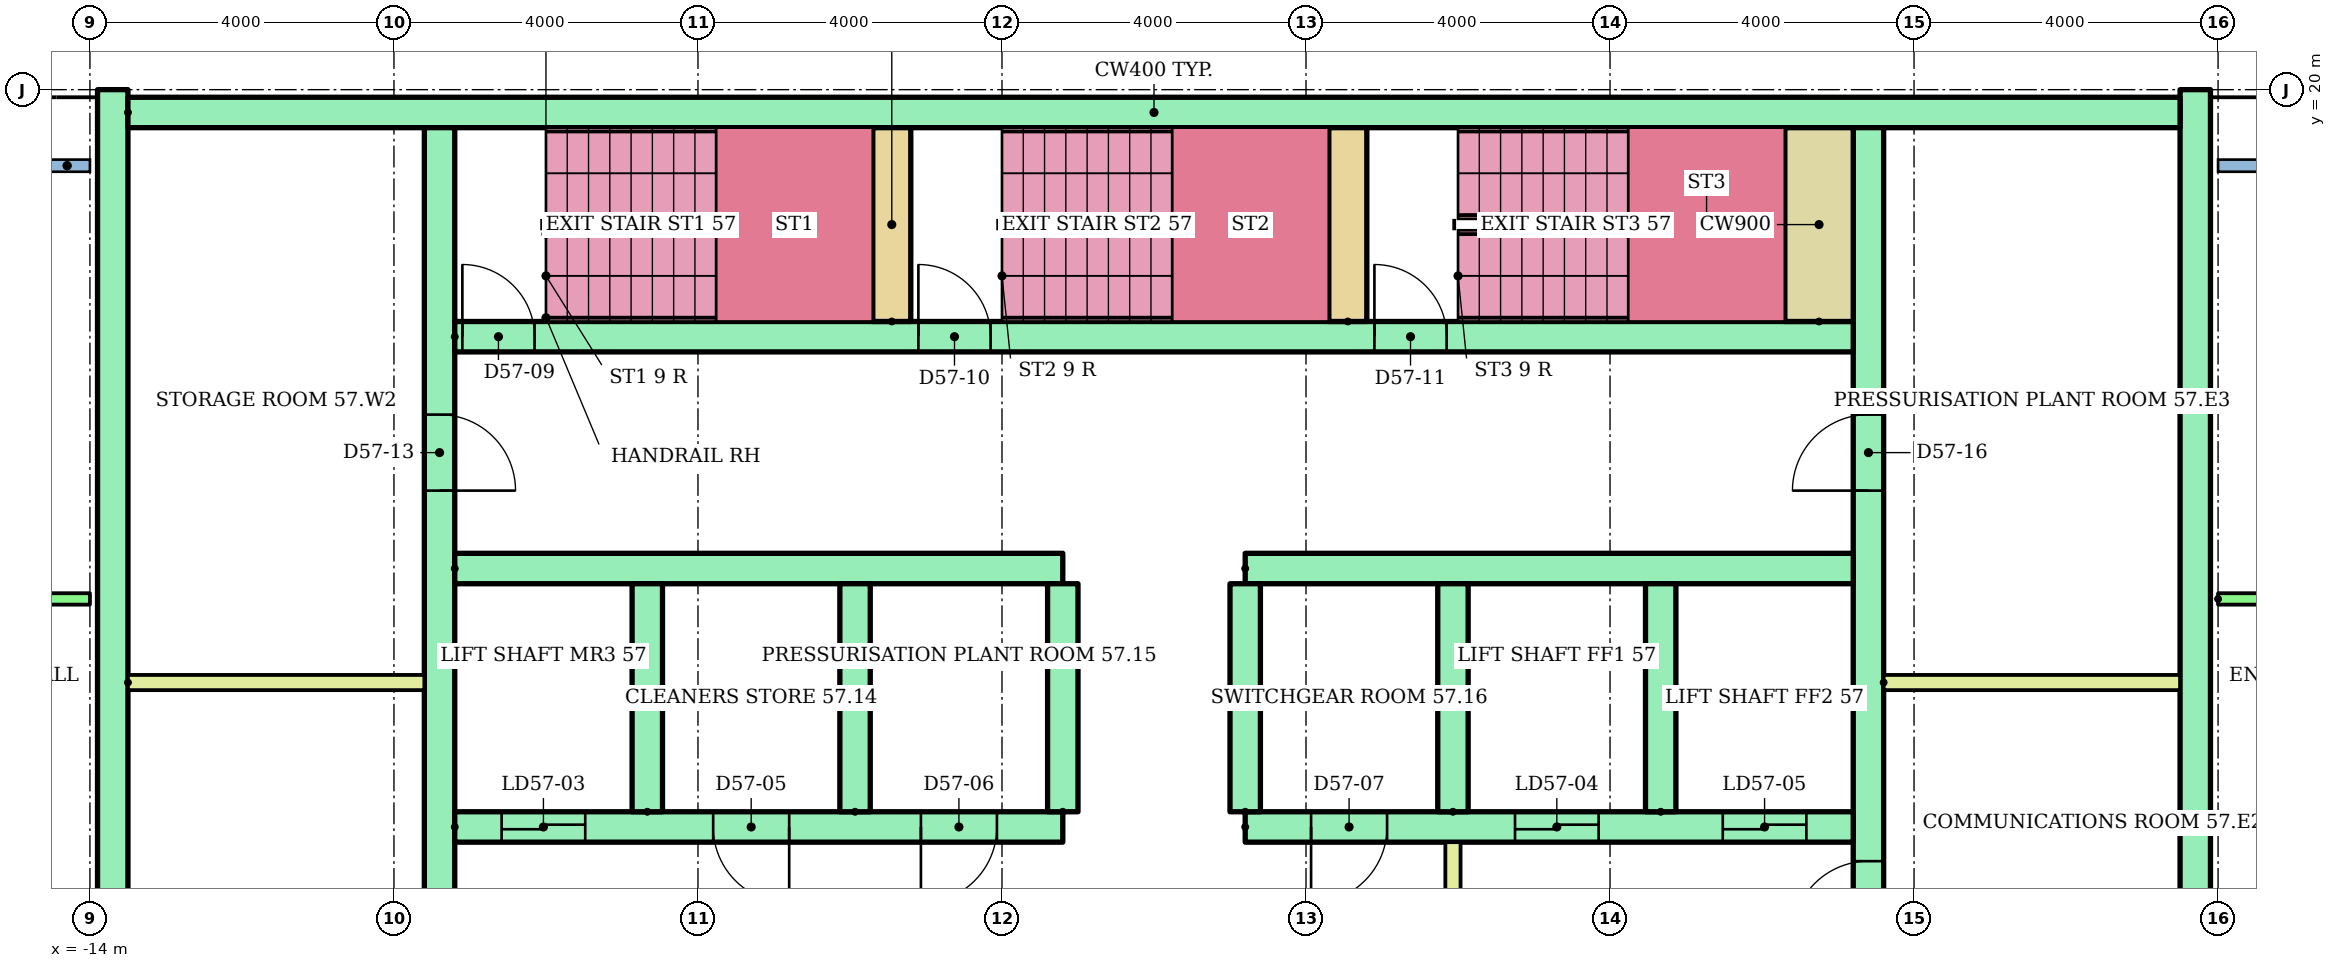
"""IFC4 building model, lengths in metres.
Left out: names, types, materials, properties, quantities, classifications, styles, units other than length and angle.
Written with IfcOpenShell. Run it as: python <this file> out.ifc"""

import sys

from ifc_helpers import new_model, si_unit, direction, frame, frame_2d, origin, place, context, subcontext, project, spatial, rectangle, extrude, element, fill, save


model = new_model("IFC4")
c1 = context("Model", 3, precision=1e-05, world=origin(), true_north=direction((0.0, 1.0)))
c2 = subcontext(c1, "Body", "Model", "MODEL_VIEW")
j1 = project(units=[si_unit("LENGTHUNIT", "METRE"), si_unit("PLANEANGLEUNIT", "RADIAN")], contexts=[c1])
p1 = place(None, origin())
s1 = spatial("IfcSite", under=j1, at=p1, CompositionType="ELEMENT")
p2 = place(p1, origin())
s2 = spatial("IfcBuilding", under=s1, at=p2, CompositionType="ELEMENT")
p3 = place(p2, frame((0.0, 0.0, 220.4)))
s3 = spatial("IfcBuildingStorey", under=s2, at=p3, CompositionType="ELEMENT", Elevation=220.4)
for number, where, z_axis, x_axis in (
    (1, (-13.7, 3.0, 0.0), (0.0, 0.0, 1.0), (0.0, 1.0, 0.0)),
    (2, (13.7, 3.0, 0.0), (0.0, 0.0, 1.0), (0.0, 1.0, 0.0)),
):
    element("IfcWall", number, at=place(p3, frame(where, z_axis=z_axis, x_axis=x_axis)), inside=s3, PredefinedType="SHEAR", context=c2, shape_type="SweptSolid", body=[
        extrude(rectangle(XDim=17.0, YDim=0.4, at=frame_2d((8.5, 0.0))), origin(), (0.0, 0.0, 1.0), 2.92),
    ])
p4 = place(p3, frame((-13.5, 19.7, 0.0)))
e3 = element("IfcWall", 3, at=p4, inside=s3, PredefinedType="SHEAR", context=c2, shape_type="SweptSolid", body=[
    extrude(rectangle(XDim=27.0, YDim=0.4, at=frame_2d((13.5, 0.0))), origin(), (0.0, 0.0, 1.0), 2.92),
])
p5 = place(p3, frame((-9.4, 6.8, 0.0), z_axis=(0.0, 0.0, 1.0), x_axis=(0.0, 1.0, 0.0)))
e4 = element("IfcWall", 4, at=p5, inside=s3, PredefinedType="SHEAR", context=c2, shape_type="SweptSolid", body=[
    extrude(rectangle(XDim=12.7, YDim=0.4, at=frame_2d((6.35, 0.0))), origin(), (0.0, 0.0, 1.0), 2.92),
])
p6 = place(p5, frame((1.15, 0.0, 0.0)))
e5 = element("IfcOpeningElement", 5, at=p6, cuts=e4, PredefinedType="OPENING", context=c2, shape_type="SweptSolid", body=[
    extrude(rectangle(XDim=1.0, YDim=2.1, at=frame_2d((0.5, 1.05))), frame((0.0, 0.21, 0.0), z_axis=(0.0, -1.0, 0.0), x_axis=(1.0, 0.0, 0.0)), (0.0, 0.0, 1.0), 0.42),
])
p7 = place(p5, frame((7.925, 0.0, 0.0)))
e6 = element("IfcOpeningElement", 6, at=p7, cuts=e4, PredefinedType="OPENING", context=c2, shape_type="SweptSolid", body=[
    extrude(rectangle(XDim=1.0, YDim=2.1, at=frame_2d((0.5, 1.05))), frame((0.0, 0.21, 0.0), z_axis=(0.0, -1.0, 0.0), x_axis=(1.0, 0.0, 0.0)), (0.0, 0.0, 1.0), 0.42),
])
p8 = place(p3, frame((9.4, 6.8, 0.0), z_axis=(0.0, 0.0, 1.0), x_axis=(0.0, 1.0, 0.0)))
e7 = element("IfcWall", 7, at=p8, inside=s3, PredefinedType="SHEAR", context=c2, shape_type="SweptSolid", body=[
    extrude(rectangle(XDim=12.7, YDim=0.4, at=frame_2d((6.35, 0.0))), origin(), (0.0, 0.0, 1.0), 2.92),
])
p9 = place(p8, frame((0.3, 0.0, 0.0)))
e8 = element("IfcOpeningElement", 8, at=p9, cuts=e7, PredefinedType="OPENING", context=c2, shape_type="SweptSolid", body=[
    extrude(rectangle(XDim=1.0, YDim=2.1, at=frame_2d((0.5, 1.05))), frame((0.0, 0.21, 0.0), z_axis=(0.0, -1.0, 0.0), x_axis=(1.0, 0.0, 0.0)), (0.0, 0.0, 1.0), 0.42),
])
p10 = place(p8, frame((2.05, 0.0, 0.0)))
e9 = element("IfcOpeningElement", 9, at=p10, cuts=e7, PredefinedType="OPENING", context=c2, shape_type="SweptSolid", body=[
    extrude(rectangle(XDim=1.0, YDim=2.1, at=frame_2d((0.5, 1.05))), frame((0.0, 0.21, 0.0), z_axis=(0.0, -1.0, 0.0), x_axis=(1.0, 0.0, 0.0)), (0.0, 0.0, 1.0), 0.42),
])
p11 = place(p8, frame((7.925, 0.0, 0.0)))
e10 = element("IfcOpeningElement", 10, at=p11, cuts=e7, PredefinedType="OPENING", context=c2, shape_type="SweptSolid", body=[
    extrude(rectangle(XDim=1.0, YDim=2.1, at=frame_2d((0.5, 1.05))), frame((0.0, 0.21, 0.0), z_axis=(0.0, -1.0, 0.0), x_axis=(1.0, 0.0, 0.0)), (0.0, 0.0, 1.0), 0.42),
])
p12 = place(p3, frame((-9.2, 10.3, 0.0)))
e11 = element("IfcWall", 11, at=p12, inside=s3, PredefinedType="SHEAR", context=c2, shape_type="SweptSolid", body=[
    extrude(rectangle(XDim=8.0, YDim=0.4, at=frame_2d((4.0, 0.0))), origin(), (0.0, 0.0, 1.0), 2.92),
])
p13 = place(p12, frame((0.617, 0.0, 0.0)))
e12 = element("IfcOpeningElement", 12, at=p13, cuts=e11, PredefinedType="OPENING", context=c2, shape_type="SweptSolid", body=[
    extrude(rectangle(XDim=1.1, YDim=2.1, at=frame_2d((0.55, 1.05))), frame((0.0, 0.21, 0.0), z_axis=(0.0, -1.0, 0.0), x_axis=(1.0, 0.0, 0.0)), (0.0, 0.0, 1.0), 0.42),
])
p14 = place(p12, frame((3.4, 0.0, 0.0)))
e13 = element("IfcOpeningElement", 13, at=p14, cuts=e11, PredefinedType="OPENING", context=c2, shape_type="SweptSolid", body=[
    extrude(rectangle(XDim=1.0, YDim=2.1, at=frame_2d((0.5, 1.05))), frame((0.0, 0.21, 0.0), z_axis=(0.0, -1.0, 0.0), x_axis=(1.0, 0.0, 0.0)), (0.0, 0.0, 1.0), 0.42),
])
p15 = place(p12, frame((6.133, 0.0, 0.0)))
e14 = element("IfcOpeningElement", 14, at=p15, cuts=e11, PredefinedType="OPENING", context=c2, shape_type="SweptSolid", body=[
    extrude(rectangle(XDim=1.0, YDim=2.1, at=frame_2d((0.5, 1.05))), frame((0.0, 0.21, 0.0), z_axis=(0.0, -1.0, 0.0), x_axis=(1.0, 0.0, 0.0)), (0.0, 0.0, 1.0), 0.42),
])
p16 = place(p3, frame((-9.2, 13.7, 0.0)))
e15 = element("IfcWall", 15, at=p16, inside=s3, PredefinedType="SHEAR", context=c2, shape_type="SweptSolid", body=[
    extrude(rectangle(XDim=8.0, YDim=0.4, at=frame_2d((4.0, 0.0))), origin(), (0.0, 0.0, 1.0), 2.92),
])
p17 = place(p3, frame((1.2, 10.3, 0.0)))
e16 = element("IfcWall", 16, at=p17, inside=s3, PredefinedType="SHEAR", context=c2, shape_type="SweptSolid", body=[
    extrude(rectangle(XDim=8.0, YDim=0.4, at=frame_2d((4.0, 0.0))), origin(), (0.0, 0.0, 1.0), 2.92),
])
p18 = place(p17, frame((3.55, 0.0, 0.0)))
e17 = element("IfcOpeningElement", 17, at=p18, cuts=e16, PredefinedType="OPENING", context=c2, shape_type="SweptSolid", body=[
    extrude(rectangle(XDim=1.1, YDim=2.1, at=frame_2d((0.55, 1.05))), frame((0.0, 0.21, 0.0), z_axis=(0.0, -1.0, 0.0), x_axis=(1.0, 0.0, 0.0)), (0.0, 0.0, 1.0), 0.42),
])
p19 = place(p17, frame((6.283, 0.0, 0.0)))
e18 = element("IfcOpeningElement", 18, at=p19, cuts=e16, PredefinedType="OPENING", context=c2, shape_type="SweptSolid", body=[
    extrude(rectangle(XDim=1.1, YDim=2.1, at=frame_2d((0.55, 1.05))), frame((0.0, 0.21, 0.0), z_axis=(0.0, -1.0, 0.0), x_axis=(1.0, 0.0, 0.0)), (0.0, 0.0, 1.0), 0.42),
])
p20 = place(p17, frame((0.867, 0.0, 0.0)))
e19 = element("IfcOpeningElement", 19, at=p20, cuts=e16, PredefinedType="OPENING", context=c2, shape_type="SweptSolid", body=[
    extrude(rectangle(XDim=1.0, YDim=2.1, at=frame_2d((0.5, 1.05))), frame((0.0, 0.21, 0.0), z_axis=(0.0, -1.0, 0.0), x_axis=(1.0, 0.0, 0.0)), (0.0, 0.0, 1.0), 0.42),
])
p21 = place(p3, frame((1.2, 13.7, 0.0)))
e20 = element("IfcWall", 20, at=p21, inside=s3, PredefinedType="SHEAR", context=c2, shape_type="SweptSolid", body=[
    extrude(rectangle(XDim=8.0, YDim=0.4, at=frame_2d((4.0, 0.0))), origin(), (0.0, 0.0, 1.0), 2.92),
])
for number, where, z_axis, x_axis in (
    (21, (-6.667, 10.5, 0.0), (0.0, 0.0, 1.0), (0.0, 1.0, 0.0)),
    (22, (-3.933, 10.5, 0.0), (0.0, 0.0, 1.0), (0.0, 1.0, 0.0)),
    (23, (-1.2, 10.5, 0.0), (0.0, 0.0, 1.0), (0.0, 1.0, 0.0)),
    (24, (1.2, 10.5, 0.0), (0.0, 0.0, 1.0), (0.0, 1.0, 0.0)),
    (25, (3.933, 10.5, 0.0), (0.0, 0.0, 1.0), (0.0, 1.0, 0.0)),
    (26, (6.667, 10.5, 0.0), (0.0, 0.0, 1.0), (0.0, 1.0, 0.0)),
):
    element("IfcWall", number, at=place(p3, frame(where, z_axis=z_axis, x_axis=x_axis)), inside=s3, PredefinedType="SHEAR", context=c2, shape_type="SweptSolid", body=[
        extrude(rectangle(XDim=3.0, YDim=0.4, at=frame_2d((1.5, 0.0))), origin(), (0.0, 0.0, 1.0), 2.92),
    ])
p22 = place(p3, frame((3.933, 6.8, 0.0), z_axis=(0.0, 0.0, 1.0), x_axis=(0.0, 1.0, 0.0)))
e27 = element("IfcWall", 27, at=p22, inside=s3, PredefinedType="PARTITIONING", context=c2, shape_type="SweptSolid", body=[
    extrude(rectangle(XDim=3.3, YDim=0.2, at=frame_2d((1.65, 0.0))), origin(), (0.0, 0.0, 1.0), 2.92),
])
p23 = place(p22, frame((1.1, 0.0, 0.0)))
e28 = element("IfcOpeningElement", 28, at=p23, cuts=e27, PredefinedType="OPENING", context=c2, shape_type="SweptSolid", body=[
    extrude(rectangle(XDim=1.1, YDim=2.1, at=frame_2d((0.55, 1.05))), frame((0.0, 0.11, 0.0), z_axis=(0.0, -1.0, 0.0), x_axis=(1.0, 0.0, 0.0)), (0.0, 0.0, 1.0), 0.22),
])
p24 = place(p3, frame((-9.2, 16.75, 0.0)))
e29 = element("IfcWall", 29, at=p24, inside=s3, PredefinedType="SHEAR", context=c2, shape_type="SweptSolid", body=[
    extrude(rectangle(XDim=18.4, YDim=0.4, at=frame_2d((9.2, 0.0))), origin(), (0.0, 0.0, 1.0), 2.92),
])
p25 = place(p24, frame((0.1, 0.0, 0.0)))
e30 = element("IfcOpeningElement", 30, at=p25, cuts=e29, PredefinedType="OPENING", context=c2, shape_type="SweptSolid", body=[
    extrude(rectangle(XDim=0.95, YDim=2.1, at=frame_2d((0.475, 1.05))), frame((0.0, 0.21, 0.0), z_axis=(0.0, -1.0, 0.0), x_axis=(1.0, 0.0, 0.0)), (0.0, 0.0, 1.0), 0.42),
])
p26 = place(p24, frame((6.1, 0.0, 0.0)))
e31 = element("IfcOpeningElement", 31, at=p26, cuts=e29, PredefinedType="OPENING", context=c2, shape_type="SweptSolid", body=[
    extrude(rectangle(XDim=0.95, YDim=2.1, at=frame_2d((0.475, 1.05))), frame((0.0, 0.21, 0.0), z_axis=(0.0, -1.0, 0.0), x_axis=(1.0, 0.0, 0.0)), (0.0, 0.0, 1.0), 0.42),
])
p27 = place(p24, frame((12.1, 0.0, 0.0)))
e32 = element("IfcOpeningElement", 32, at=p27, cuts=e29, PredefinedType="OPENING", context=c2, shape_type="SweptSolid", body=[
    extrude(rectangle(XDim=0.95, YDim=2.1, at=frame_2d((0.475, 1.05))), frame((0.0, 0.21, 0.0), z_axis=(0.0, -1.0, 0.0), x_axis=(1.0, 0.0, 0.0)), (0.0, 0.0, 1.0), 0.42),
])
for number, where, z_axis, x_axis in (
    (33, (-3.45, 16.95, 0.0), (0.0, 0.0, 1.0), (0.0, 1.0, 0.0)),
    (34, (2.55, 16.95, 0.0), (0.0, 0.0, 1.0), (0.0, 1.0, 0.0)),
):
    element("IfcWall", number, at=place(p3, frame(where, z_axis=z_axis, x_axis=x_axis)), inside=s3, PredefinedType="SHEAR", context=c2, shape_type="SweptSolid", body=[
        extrude(rectangle(XDim=2.55, YDim=0.5, at=frame_2d((1.275, 0.0))), origin(), (0.0, 0.0, 1.0), 2.92),
    ])
p28 = place(p3, frame((8.75, 16.95, 0.0), z_axis=(0.0, 0.0, 1.0), x_axis=(0.0, 1.0, 0.0)))
e35 = element("IfcWall", 35, at=p28, inside=s3, PredefinedType="SHEAR", context=c2, shape_type="SweptSolid", body=[
    extrude(rectangle(XDim=2.55, YDim=0.9, at=frame_2d((1.275, 0.0))), origin(), (0.0, 0.0, 1.0), 2.92),
])
for number, where in (
    (36, (-13.5, 12.2, 0.0)),
    (37, (9.6, 12.2, 0.0)),
):
    element("IfcWall", number, at=place(p3, frame(where)), inside=s3, PredefinedType="PARTITIONING", context=c2, shape_type="SweptSolid", body=[
        extrude(rectangle(XDim=3.9, YDim=0.2, at=frame_2d((1.95, 0.0))), origin(), (0.0, 0.0, 1.0), 2.92),
    ])
p29 = place(p3, frame((-28.92, 13.3, 0.0)))
e38 = element("IfcWall", 38, at=p29, inside=s3, PredefinedType="PARTITIONING", context=c2, shape_type="SweptSolid", body=[
    extrude(rectangle(XDim=14.92, YDim=0.15, at=frame_2d((7.46, 0.0))), origin(), (0.0, 0.0, 1.0), 2.4),
])
p30 = place(p29, frame((1.97, 0.0, 0.0)))
e39 = element("IfcOpeningElement", 39, at=p30, cuts=e38, PredefinedType="OPENING", context=c2, shape_type="SweptSolid", body=[
    extrude(rectangle(XDim=1.0, YDim=2.1, at=frame_2d((0.5, 1.05))), frame((0.0, 0.085, 0.0), z_axis=(0.0, -1.0, 0.0), x_axis=(1.0, 0.0, 0.0)), (0.0, 0.0, 1.0), 0.17),
])
p31 = place(p29, frame((9.37, 0.0, 0.0)))
e40 = element("IfcOpeningElement", 40, at=p31, cuts=e38, PredefinedType="OPENING", context=c2, shape_type="SweptSolid", body=[
    extrude(rectangle(XDim=0.9, YDim=2.1, at=frame_2d((0.45, 1.05))), frame((0.0, 0.085, 0.0), z_axis=(0.0, -1.0, 0.0), x_axis=(1.0, 0.0, 0.0)), (0.0, 0.0, 1.0), 0.17),
])
p32 = place(p3, frame((14.0, 13.3, 0.0)))
e41 = element("IfcWall", 41, at=p32, inside=s3, PredefinedType="PARTITIONING", context=c2, shape_type="SweptSolid", body=[
    extrude(rectangle(XDim=14.92, YDim=0.15, at=frame_2d((7.46, 0.0))), origin(), (0.0, 0.0, 1.0), 2.4),
])
p33 = place(p32, frame((1.55, 0.0, 0.0)))
e42 = element("IfcOpeningElement", 42, at=p33, cuts=e41, PredefinedType="OPENING", context=c2, shape_type="SweptSolid", body=[
    extrude(rectangle(XDim=0.9, YDim=2.1, at=frame_2d((0.45, 1.05))), frame((0.0, 0.085, 0.0), z_axis=(0.0, -1.0, 0.0), x_axis=(1.0, 0.0, 0.0)), (0.0, 0.0, 1.0), 0.17),
])
p34 = place(p32, frame((6.6, 0.0, 0.0)))
e43 = element("IfcOpeningElement", 43, at=p34, cuts=e41, PredefinedType="OPENING", context=c2, shape_type="SweptSolid", body=[
    extrude(rectangle(XDim=1.0, YDim=2.1, at=frame_2d((0.5, 1.05))), frame((0.0, 0.085, 0.0), z_axis=(0.0, -1.0, 0.0), x_axis=(1.0, 0.0, 0.0)), (0.0, 0.0, 1.0), 0.17),
])
p35 = place(p32, frame((12.0, 0.0, 0.0)))
e44 = element("IfcOpeningElement", 44, at=p35, cuts=e41, PredefinedType="OPENING", context=c2, shape_type="SweptSolid", body=[
    extrude(rectangle(XDim=0.9, YDim=2.1, at=frame_2d((0.45, 1.05))), frame((0.0, 0.085, 0.0), z_axis=(0.0, -1.0, 0.0), x_axis=(1.0, 0.0, 0.0)), (0.0, 0.0, 1.0), 0.17),
])
p36 = place(p13, origin())
e45 = element("IfcDoor", 45, at=p36, inside=s3, OperationType="SLIDING_TO_LEFT", PredefinedType="DOOR", context=c2, shape_type="SweptSolid", body=[
    extrude(rectangle(XDim=1.1, YDim=2.1, at=frame_2d((0.55, 1.05))), frame((0.0, 0.025, 0.0), z_axis=(0.0, -1.0, 0.0), x_axis=(1.0, 0.0, 0.0)), (0.0, 0.0, 1.0), 0.05),
])
fill(e12, e45)
p37 = place(p18, origin())
e46 = element("IfcDoor", 46, at=p37, inside=s3, OperationType="SLIDING_TO_LEFT", PredefinedType="DOOR", context=c2, shape_type="SweptSolid", body=[
    extrude(rectangle(XDim=1.1, YDim=2.1, at=frame_2d((0.55, 1.05))), frame((0.0, 0.025, 0.0), z_axis=(0.0, -1.0, 0.0), x_axis=(1.0, 0.0, 0.0)), (0.0, 0.0, 1.0), 0.05),
])
fill(e17, e46)
p38 = place(p19, origin())
e47 = element("IfcDoor", 47, at=p38, inside=s3, OperationType="SLIDING_TO_LEFT", PredefinedType="DOOR", context=c2, shape_type="SweptSolid", body=[
    extrude(rectangle(XDim=1.1, YDim=2.1, at=frame_2d((0.55, 1.05))), frame((0.0, 0.025, 0.0), z_axis=(0.0, -1.0, 0.0), x_axis=(1.0, 0.0, 0.0)), (0.0, 0.0, 1.0), 0.05),
])
fill(e18, e47)
p39 = place(p14, frame((1.0, 0.0, 0.0), z_axis=(0.0, 0.0, 1.0), x_axis=(-1.0, 0.0, 0.0)))
e48 = element("IfcDoor", 48, at=p39, inside=s3, OperationType="SINGLE_SWING_RIGHT", PredefinedType="DOOR", context=c2, shape_type="SweptSolid", body=[
    extrude(rectangle(XDim=1.0, YDim=2.1, at=frame_2d((0.5, 1.05))), frame((0.0, 0.025, 0.0), z_axis=(0.0, -1.0, 0.0), x_axis=(1.0, 0.0, 0.0)), (0.0, 0.0, 1.0), 0.05),
])
fill(e13, e48)
p40 = place(p15, frame((1.0, 0.0, 0.0), z_axis=(0.0, 0.0, 1.0), x_axis=(-1.0, 0.0, 0.0)))
e49 = element("IfcDoor", 49, at=p40, inside=s3, OperationType="SINGLE_SWING_LEFT", PredefinedType="DOOR", context=c2, shape_type="SweptSolid", body=[
    extrude(rectangle(XDim=1.0, YDim=2.1, at=frame_2d((0.5, 1.05))), frame((0.0, 0.025, 0.0), z_axis=(0.0, -1.0, 0.0), x_axis=(1.0, 0.0, 0.0)), (0.0, 0.0, 1.0), 0.05),
])
fill(e14, e49)
p41 = place(p20, frame((1.0, 0.0, 0.0), z_axis=(0.0, 0.0, 1.0), x_axis=(-1.0, 0.0, 0.0)))
e50 = element("IfcDoor", 50, at=p41, inside=s3, OperationType="SINGLE_SWING_LEFT", PredefinedType="DOOR", context=c2, shape_type="SweptSolid", body=[
    extrude(rectangle(XDim=1.0, YDim=2.1, at=frame_2d((0.5, 1.05))), frame((0.0, 0.025, 0.0), z_axis=(0.0, -1.0, 0.0), x_axis=(1.0, 0.0, 0.0)), (0.0, 0.0, 1.0), 0.05),
])
fill(e19, e50)
p42 = place(p25, origin())
e51 = element("IfcDoor", 51, at=p42, inside=s3, OperationType="SINGLE_SWING_LEFT", PredefinedType="DOOR", context=c2, shape_type="SweptSolid", body=[
    extrude(rectangle(XDim=0.95, YDim=2.1, at=frame_2d((0.475, 1.05))), frame((0.0, 0.025, 0.0), z_axis=(0.0, -1.0, 0.0), x_axis=(1.0, 0.0, 0.0)), (0.0, 0.0, 1.0), 0.05),
])
fill(e30, e51)
p43 = place(p26, origin())
e52 = element("IfcDoor", 52, at=p43, inside=s3, OperationType="SINGLE_SWING_LEFT", PredefinedType="DOOR", context=c2, shape_type="SweptSolid", body=[
    extrude(rectangle(XDim=0.95, YDim=2.1, at=frame_2d((0.475, 1.05))), frame((0.0, 0.025, 0.0), z_axis=(0.0, -1.0, 0.0), x_axis=(1.0, 0.0, 0.0)), (0.0, 0.0, 1.0), 0.05),
])
fill(e31, e52)
p44 = place(p27, origin())
e53 = element("IfcDoor", 53, at=p44, inside=s3, OperationType="SINGLE_SWING_LEFT", PredefinedType="DOOR", context=c2, shape_type="SweptSolid", body=[
    extrude(rectangle(XDim=0.95, YDim=2.1, at=frame_2d((0.475, 1.05))), frame((0.0, 0.025, 0.0), z_axis=(0.0, -1.0, 0.0), x_axis=(1.0, 0.0, 0.0)), (0.0, 0.0, 1.0), 0.05),
])
fill(e32, e53)
p45 = place(p7, frame((1.0, 0.0, 0.0), z_axis=(0.0, 0.0, 1.0), x_axis=(-1.0, 0.0, 0.0)))
e54 = element("IfcDoor", 54, at=p45, inside=s3, OperationType="SINGLE_SWING_LEFT", PredefinedType="DOOR", context=c2, shape_type="SweptSolid", body=[
    extrude(rectangle(XDim=1.0, YDim=2.1, at=frame_2d((0.5, 1.05))), frame((0.0, 0.025, 0.0), z_axis=(0.0, -1.0, 0.0), x_axis=(1.0, 0.0, 0.0)), (0.0, 0.0, 1.0), 0.05),
])
fill(e6, e54)
p46 = place(p10, origin())
e55 = element("IfcDoor", 55, at=p46, inside=s3, OperationType="SINGLE_SWING_LEFT", PredefinedType="DOOR", context=c2, shape_type="SweptSolid", body=[
    extrude(rectangle(XDim=1.0, YDim=2.1, at=frame_2d((0.5, 1.05))), frame((0.0, 0.025, 0.0), z_axis=(0.0, -1.0, 0.0), x_axis=(1.0, 0.0, 0.0)), (0.0, 0.0, 1.0), 0.05),
])
fill(e9, e55)
p47 = place(p11, origin())
e56 = element("IfcDoor", 56, at=p47, inside=s3, OperationType="SINGLE_SWING_LEFT", PredefinedType="DOOR", context=c2, shape_type="SweptSolid", body=[
    extrude(rectangle(XDim=1.0, YDim=2.1, at=frame_2d((0.5, 1.05))), frame((0.0, 0.025, 0.0), z_axis=(0.0, -1.0, 0.0), x_axis=(1.0, 0.0, 0.0)), (0.0, 0.0, 1.0), 0.05),
])
fill(e10, e56)
save(model, sys.argv[1])
